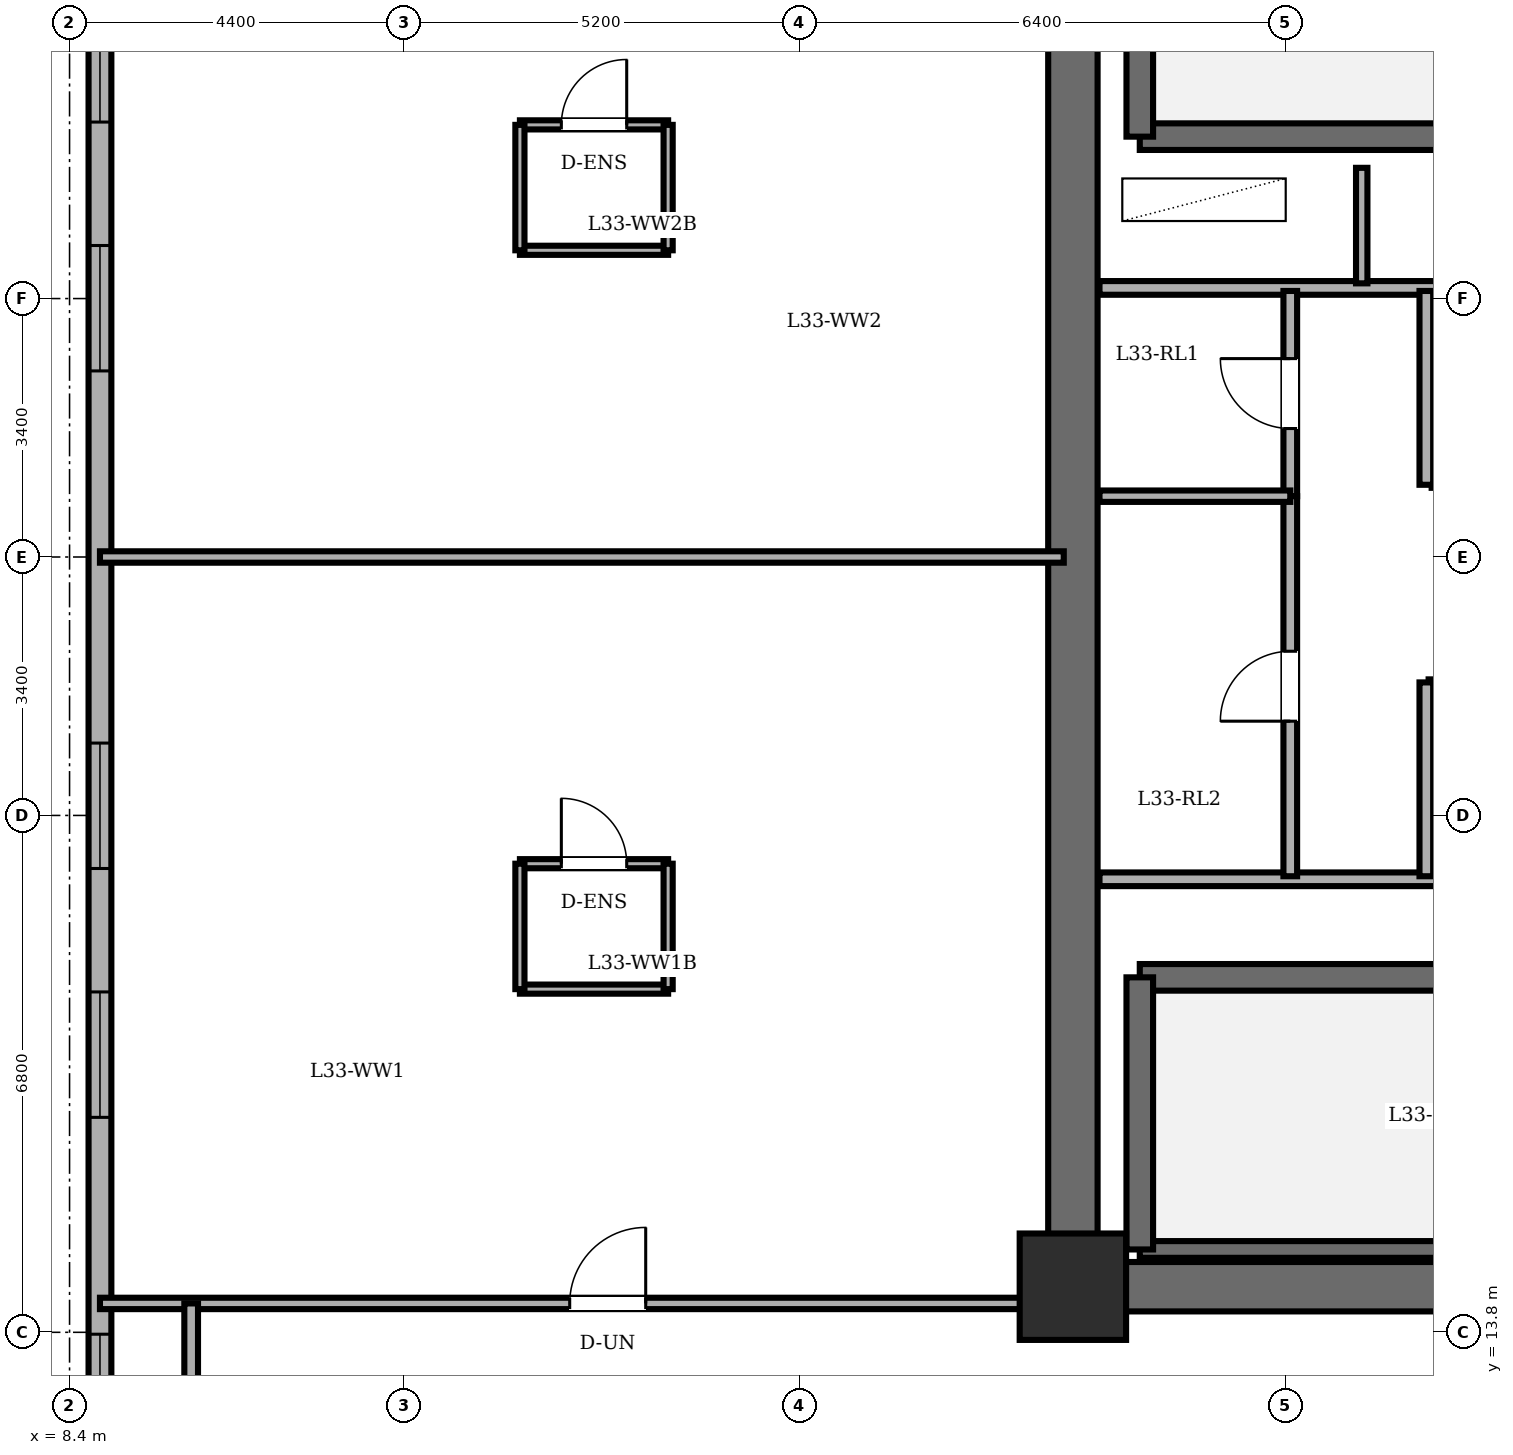
"""IFC4 building model, lengths in metres.
Left out: names, types, materials, properties, quantities, classifications, styles, units other than length and angle.
Written with IfcOpenShell. Run it as: python <this file> out.ifc"""

import sys

from ifc_helpers import new_model, si_unit, direction, frame, frame_2d, origin, origin_2d, place, context, subcontext, project, spatial, rectangle, extrude, element, fill, save


model = new_model("IFC4")
c1 = context("Model", 3, precision=1e-05, world=origin(), true_north=direction((0.0, 1.0)))
c2 = subcontext(c1, "Body", "Model", "MODEL_VIEW")
j1 = project(units=[si_unit("LENGTHUNIT", "METRE"), si_unit("PLANEANGLEUNIT", "RADIAN")], contexts=[c1])
p1 = place(None, origin())
s1 = spatial("IfcSite", under=j1, at=p1, CompositionType="ELEMENT")
p2 = place(p1, origin())
s2 = spatial("IfcBuilding", under=s1, at=p2, CompositionType="ELEMENT")
p3 = place(p2, frame((0.0, 0.0, 125.9)))
s3 = spatial("IfcBuildingStorey", under=s2, at=p3, CompositionType="ELEMENT", Elevation=125.9)
p4 = place(p3, frame((21.6, 14.4, 0.0), z_axis=(0.0, 0.0, 1.0), x_axis=(1.0, 0.0, 0.0)))
e1 = element("IfcColumn", 1, at=p4, inside=s3, PredefinedType="COLUMN", context=c2, shape_type="SweptSolid", body=[
    extrude(rectangle(XDim=1.4, YDim=1.4, at=origin_2d()), origin(), (0.0, 0.0, 1.0), 3.6),
])
p5 = place(p3, frame((8.8, 38.2, 0.0), z_axis=(0.0, 0.0, 1.0), x_axis=(0.0, -1.0, 0.0)))
e2 = element("IfcWall", 2, at=p5, inside=s3, PredefinedType="SOLIDWALL", context=c2, shape_type="SweptSolid", body=[
    extrude(rectangle(XDim=28.4, YDim=0.3, at=frame_2d((14.2, 0.0))), origin(), (0.0, 0.0, 1.0), 3.4),
])
p6 = place(p5, frame((2.325, 0.0, 0.85)))
e3 = element("IfcOpeningElement", 3, at=p6, cuts=e2, PredefinedType="OPENING", context=c2, shape_type="SweptSolid", body=[
    extrude(rectangle(XDim=1.65, YDim=1.55, at=frame_2d((0.825, 0.775))), frame((0.0, 0.16, 0.0), z_axis=(0.0, -1.0, 0.0), x_axis=(1.0, 0.0, 0.0)), (0.0, 0.0, 1.0), 0.32),
])
p7 = place(p5, frame((6.828, 0.0, 0.85)))
e4 = element("IfcOpeningElement", 4, at=p7, cuts=e2, PredefinedType="OPENING", context=c2, shape_type="SweptSolid", body=[
    extrude(rectangle(XDim=1.65, YDim=1.55, at=frame_2d((0.825, 0.775))), frame((0.0, 0.16, 0.0), z_axis=(0.0, -1.0, 0.0), x_axis=(1.0, 0.0, 0.0)), (0.0, 0.0, 1.0), 0.32),
])
p8 = place(p5, frame((10.102, 0.0, 0.85)))
e5 = element("IfcOpeningElement", 5, at=p8, cuts=e2, PredefinedType="OPENING", context=c2, shape_type="SweptSolid", body=[
    extrude(rectangle(XDim=1.65, YDim=1.55, at=frame_2d((0.825, 0.775))), frame((0.0, 0.16, 0.0), z_axis=(0.0, -1.0, 0.0), x_axis=(1.0, 0.0, 0.0)), (0.0, 0.0, 1.0), 0.32),
])
p9 = place(p5, frame((16.648, 0.0, 0.85)))
e6 = element("IfcOpeningElement", 6, at=p9, cuts=e2, PredefinedType="OPENING", context=c2, shape_type="SweptSolid", body=[
    extrude(rectangle(XDim=1.65, YDim=1.55, at=frame_2d((0.825, 0.775))), frame((0.0, 0.16, 0.0), z_axis=(0.0, -1.0, 0.0), x_axis=(1.0, 0.0, 0.0)), (0.0, 0.0, 1.0), 0.32),
])
p10 = place(p5, frame((19.922, 0.0, 0.85)))
e7 = element("IfcOpeningElement", 7, at=p10, cuts=e2, PredefinedType="OPENING", context=c2, shape_type="SweptSolid", body=[
    extrude(rectangle(XDim=1.65, YDim=1.55, at=frame_2d((0.825, 0.775))), frame((0.0, 0.16, 0.0), z_axis=(0.0, -1.0, 0.0), x_axis=(1.0, 0.0, 0.0)), (0.0, 0.0, 1.0), 0.32),
])
p11 = place(p5, frame((24.425, 0.0, 0.85)))
e8 = element("IfcOpeningElement", 8, at=p11, cuts=e2, PredefinedType="OPENING", context=c2, shape_type="SweptSolid", body=[
    extrude(rectangle(XDim=1.65, YDim=1.55, at=frame_2d((0.825, 0.775))), frame((0.0, 0.16, 0.0), z_axis=(0.0, -1.0, 0.0), x_axis=(1.0, 0.0, 0.0)), (0.0, 0.0, 1.0), 0.32),
])
p12 = place(p3, frame((21.6, 14.4, 0.0), z_axis=(0.0, 0.0, 1.0), x_axis=(0.0, 1.0, 0.0)))
e9 = element("IfcWall", 9, at=p12, inside=s3, PredefinedType="SHEAR", context=c2, shape_type="SweptSolid", body=[
    extrude(rectangle(XDim=19.2, YDim=0.65, at=frame_2d((9.6, 0.0))), origin(), (0.0, 0.0, 1.0), 3.4),
])
p13 = place(p3, frame((37.2, 14.4, 0.0), z_axis=(0.0, 0.0, 1.0), x_axis=(-1.0, 0.0, 0.0)))
e10 = element("IfcWall", 10, at=p13, inside=s3, PredefinedType="SHEAR", context=c2, shape_type="SweptSolid", body=[
    extrude(rectangle(XDim=15.6, YDim=0.65, at=frame_2d((7.8, 0.0))), origin(), (0.0, 0.0, 1.0), 3.4),
])
p14 = place(p3, frame((22.48, 29.53, 0.0), z_axis=(0.0, 0.0, 1.0), x_axis=(1.0, 0.0, 0.0)))
e11 = element("IfcWall", 11, at=p14, inside=s3, PredefinedType="SOLIDWALL", context=c2, shape_type="SweptSolid", body=[
    extrude(rectangle(XDim=7.79, YDim=0.35, at=frame_2d((3.895, 0.0))), origin(), (0.0, 0.0, 1.0), 3.4),
])
p15 = place(p3, frame((22.48, 29.53, 0.0), z_axis=(0.0, 0.0, 1.0), x_axis=(0.0, 1.0, 0.0)))
e12 = element("IfcWall", 12, at=p15, inside=s3, PredefinedType="SOLIDWALL", context=c2, shape_type="SweptSolid", body=[
    extrude(rectangle(XDim=3.58, YDim=0.35, at=frame_2d((1.79, 0.0))), origin(), (0.0, 0.0, 1.0), 3.4),
])
p16 = place(p3, frame((22.48, 18.47, 0.0), z_axis=(0.0, 0.0, 1.0), x_axis=(1.0, 0.0, 0.0)))
e13 = element("IfcWall", 13, at=p16, inside=s3, PredefinedType="SOLIDWALL", context=c2, shape_type="SweptSolid", body=[
    extrude(rectangle(XDim=7.79, YDim=0.35, at=frame_2d((3.895, 0.0))), origin(), (0.0, 0.0, 1.0), 3.4),
])
p17 = place(p3, frame((22.48, 14.89, 0.0), z_axis=(0.0, 0.0, 1.0), x_axis=(1.0, 0.0, 0.0)))
e14 = element("IfcWall", 14, at=p17, inside=s3, PredefinedType="PARTITIONING", context=c2, shape_type="SweptSolid", body=[
    extrude(rectangle(XDim=7.79, YDim=0.22, at=frame_2d((3.895, 0.0))), origin(), (0.0, 0.0, 1.0), 3.4),
])
p18 = place(p3, frame((22.48, 14.89, 0.0), z_axis=(0.0, 0.0, 1.0), x_axis=(0.0, 1.0, 0.0)))
e15 = element("IfcWall", 15, at=p18, inside=s3, PredefinedType="SOLIDWALL", context=c2, shape_type="SweptSolid", body=[
    extrude(rectangle(XDim=3.58, YDim=0.35, at=frame_2d((1.79, 0.0))), origin(), (0.0, 0.0, 1.0), 3.4),
])
p19 = place(p3, frame((21.95, 27.54, 0.0), z_axis=(0.0, 0.0, 1.0), x_axis=(1.0, 0.0, 0.0)))
e16 = element("IfcWall", 16, at=p19, inside=s3, PredefinedType="PARTITIONING", context=c2, shape_type="SweptSolid", body=[
    extrude(rectangle(XDim=10.56, YDim=0.18, at=frame_2d((5.28, 0.0))), origin(), (0.0, 0.0, 1.0), 3.4),
])
p20 = place(p3, frame((25.4, 27.6, 0.0), z_axis=(0.0, 0.0, 1.0), x_axis=(0.0, 1.0, 0.0)))
e17 = element("IfcWall", 17, at=p20, inside=s3, PredefinedType="PARTITIONING", context=c2, shape_type="SweptSolid", body=[
    extrude(rectangle(XDim=1.52, YDim=0.15, at=frame_2d((0.76, 0.0))), origin(), (0.0, 0.0, 1.0), 3.4),
])
p21 = place(p3, frame((21.95, 19.76, 0.0), z_axis=(0.0, 0.0, 1.0), x_axis=(1.0, 0.0, 0.0)))
e18 = element("IfcWall", 18, at=p21, inside=s3, PredefinedType="PARTITIONING", context=c2, shape_type="SweptSolid", body=[
    extrude(rectangle(XDim=14.87, YDim=0.18, at=frame_2d((7.435, 0.0))), origin(), (0.0, 0.0, 1.0), 3.4),
])
p22 = place(p3, frame((28.34, 25.0, 0.0), z_axis=(0.0, 0.0, 1.0), x_axis=(-1.0, 0.0, 0.0)))
e19 = element("IfcWall", 19, at=p22, inside=s3, PredefinedType="PARTITIONING", context=c2, shape_type="SweptSolid", body=[
    extrude(rectangle(XDim=2.02, YDim=0.18, at=frame_2d((1.01, 0.0))), origin(), (0.0, 0.0, 1.0), 3.4),
])
p23 = place(p22, frame((0.435, 0.0, 0.0)))
e20 = element("IfcOpeningElement", 20, at=p23, cuts=e19, PredefinedType="OPENING", context=c2, shape_type="SweptSolid", body=[
    extrude(rectangle(XDim=1.15, YDim=2.2, at=frame_2d((0.575, 1.1))), frame((0.0, 0.1, 0.0), z_axis=(0.0, -1.0, 0.0), x_axis=(1.0, 0.0, 0.0)), (0.0, 0.0, 1.0), 0.2),
])
p24 = place(p3, frame((26.28, 22.3, 0.0), z_axis=(0.0, 0.0, 1.0), x_axis=(1.0, 0.0, 0.0)))
e21 = element("IfcWall", 21, at=p24, inside=s3, PredefinedType="PARTITIONING", context=c2, shape_type="SweptSolid", body=[
    extrude(rectangle(XDim=2.0, YDim=0.18, at=frame_2d((1.0, 0.0))), origin(), (0.0, 0.0, 1.0), 3.4),
])
p25 = place(p24, frame((0.425, 0.0, 0.0)))
e22 = element("IfcOpeningElement", 22, at=p25, cuts=e21, PredefinedType="OPENING", context=c2, shape_type="SweptSolid", body=[
    extrude(rectangle(XDim=1.15, YDim=2.2, at=frame_2d((0.575, 1.1))), frame((0.0, 0.1, 0.0), z_axis=(0.0, -1.0, 0.0), x_axis=(1.0, 0.0, 0.0)), (0.0, 0.0, 1.0), 0.2),
])
p26 = place(p3, frame((24.46, 24.8, 0.0), z_axis=(0.0, 0.0, 1.0), x_axis=(0.0, 1.0, 0.0)))
e23 = element("IfcWall", 23, at=p26, inside=s3, PredefinedType="PARTITIONING", context=c2, shape_type="SweptSolid", body=[
    extrude(rectangle(XDim=2.7, YDim=0.18, at=frame_2d((1.35, 0.0))), origin(), (0.0, 0.0, 1.0), 3.4),
])
p27 = place(p26, frame((0.89, 0.0, 0.0)))
e24 = element("IfcOpeningElement", 24, at=p27, cuts=e23, PredefinedType="OPENING", context=c2, shape_type="SweptSolid", body=[
    extrude(rectangle(XDim=0.92, YDim=2.1, at=frame_2d((0.46, 1.05))), frame((0.0, 0.1, 0.0), z_axis=(0.0, -1.0, 0.0), x_axis=(1.0, 0.0, 0.0)), (0.0, 0.0, 1.0), 0.2),
])
p28 = place(p3, frame((24.46, 19.8, 0.0), z_axis=(0.0, 0.0, 1.0), x_axis=(0.0, 1.0, 0.0)))
e25 = element("IfcWall", 25, at=p28, inside=s3, PredefinedType="PARTITIONING", context=c2, shape_type="SweptSolid", body=[
    extrude(rectangle(XDim=5.0, YDim=0.18, at=frame_2d((2.5, 0.0))), origin(), (0.0, 0.0, 1.0), 3.4),
])
p29 = place(p28, frame((2.04, 0.0, 0.0)))
e26 = element("IfcOpeningElement", 26, at=p29, cuts=e25, PredefinedType="OPENING", context=c2, shape_type="SweptSolid", body=[
    extrude(rectangle(XDim=0.92, YDim=2.1, at=frame_2d((0.46, 1.05))), frame((0.0, 0.1, 0.0), z_axis=(0.0, -1.0, 0.0), x_axis=(1.0, 0.0, 0.0)), (0.0, 0.0, 1.0), 0.2),
])
p30 = place(p3, frame((21.95, 24.8, 0.0), z_axis=(0.0, 0.0, 1.0), x_axis=(1.0, 0.0, 0.0)))
e27 = element("IfcWall", 27, at=p30, inside=s3, PredefinedType="PARTITIONING", context=c2, shape_type="SweptSolid", body=[
    extrude(rectangle(XDim=2.51, YDim=0.15, at=frame_2d((1.255, 0.0))), origin(), (0.0, 0.0, 1.0), 3.4),
])
for number, where, z_axis, x_axis in (
    (28, (26.25, 24.95, 0.0), (0.0, 0.0, 1.0), (0.0, 1.0, 0.0)),
    (29, (26.25, 19.8, 0.0), (0.0, 0.0, 1.0), (0.0, 1.0, 0.0)),
):
    element("IfcWall", number, at=place(p3, frame(where, z_axis=z_axis, x_axis=x_axis)), inside=s3, PredefinedType="PARTITIONING", context=c2, shape_type="SweptSolid", body=[
        extrude(rectangle(XDim=2.55, YDim=0.18, at=frame_2d((1.275, 0.0))), origin(), (0.0, 0.0, 1.0), 3.4),
    ])
p31 = place(p3, frame((14.325, 19.965, 0.0), z_axis=(0.0, 0.0, 1.0), x_axis=(1.0, 0.0, 0.0)))
e30 = element("IfcWall", 30, at=p31, inside=s3, PredefinedType="PARTITIONING", context=c2, shape_type="SweptSolid", body=[
    extrude(rectangle(XDim=1.95, YDim=0.12, at=frame_2d((0.975, 0.0))), origin(), (0.0, 0.0, 1.0), 3.4),
])
p32 = place(p31, frame((0.545, 0.0, 0.0)))
e31 = element("IfcOpeningElement", 31, at=p32, cuts=e30, PredefinedType="OPENING", context=c2, shape_type="SweptSolid", body=[
    extrude(rectangle(XDim=0.86, YDim=2.1, at=frame_2d((0.43, 1.05))), frame((0.0, 0.07, 0.0), z_axis=(0.0, -1.0, 0.0), x_axis=(1.0, 0.0, 0.0)), (0.0, 0.0, 1.0), 0.14),
])
p33 = place(p3, frame((16.275, 18.315, 0.0), z_axis=(0.0, 0.0, 1.0), x_axis=(-1.0, 0.0, 0.0)))
e32 = element("IfcWall", 32, at=p33, inside=s3, PredefinedType="PARTITIONING", context=c2, shape_type="SweptSolid", body=[
    extrude(rectangle(XDim=1.95, YDim=0.12, at=frame_2d((0.975, 0.0))), origin(), (0.0, 0.0, 1.0), 3.4),
])
for number, where, z_axis, x_axis in (
    (33, (14.325, 19.965, 0.0), (0.0, 0.0, 1.0), (0.0, -1.0, 0.0)),
    (34, (16.275, 18.315, 0.0), (0.0, 0.0, 1.0), (0.0, 1.0, 0.0)),
):
    element("IfcWall", number, at=place(p3, frame(where, z_axis=z_axis, x_axis=x_axis)), inside=s3, PredefinedType="PARTITIONING", context=c2, shape_type="SweptSolid", body=[
        extrude(rectangle(XDim=1.65, YDim=0.12, at=frame_2d((0.825, 0.0))), origin(), (0.0, 0.0, 1.0), 3.4),
    ])
p34 = place(p3, frame((14.325, 29.685, 0.0), z_axis=(0.0, 0.0, 1.0), x_axis=(1.0, 0.0, 0.0)))
e35 = element("IfcWall", 35, at=p34, inside=s3, PredefinedType="PARTITIONING", context=c2, shape_type="SweptSolid", body=[
    extrude(rectangle(XDim=1.95, YDim=0.12, at=frame_2d((0.975, 0.0))), origin(), (0.0, 0.0, 1.0), 3.4),
])
p35 = place(p34, frame((0.545, 0.0, 0.0)))
e36 = element("IfcOpeningElement", 36, at=p35, cuts=e35, PredefinedType="OPENING", context=c2, shape_type="SweptSolid", body=[
    extrude(rectangle(XDim=0.86, YDim=2.1, at=frame_2d((0.43, 1.05))), frame((0.0, 0.07, 0.0), z_axis=(0.0, -1.0, 0.0), x_axis=(1.0, 0.0, 0.0)), (0.0, 0.0, 1.0), 0.14),
])
p36 = place(p3, frame((16.275, 28.035, 0.0), z_axis=(0.0, 0.0, 1.0), x_axis=(-1.0, 0.0, 0.0)))
e37 = element("IfcWall", 37, at=p36, inside=s3, PredefinedType="PARTITIONING", context=c2, shape_type="SweptSolid", body=[
    extrude(rectangle(XDim=1.95, YDim=0.12, at=frame_2d((0.975, 0.0))), origin(), (0.0, 0.0, 1.0), 3.4),
])
for number, where, z_axis, x_axis in (
    (38, (14.325, 29.685, 0.0), (0.0, 0.0, 1.0), (0.0, -1.0, 0.0)),
    (39, (16.275, 28.035, 0.0), (0.0, 0.0, 1.0), (0.0, 1.0, 0.0)),
):
    element("IfcWall", number, at=place(p3, frame(where, z_axis=z_axis, x_axis=x_axis)), inside=s3, PredefinedType="PARTITIONING", context=c2, shape_type="SweptSolid", body=[
        extrude(rectangle(XDim=1.65, YDim=0.12, at=frame_2d((0.825, 0.0))), origin(), (0.0, 0.0, 1.0), 3.4),
    ])
p37 = place(p3, frame((8.8, 14.18, 0.0), z_axis=(0.0, 0.0, 1.0), x_axis=(1.0, 0.0, 0.0)))
e40 = element("IfcWall", 40, at=p37, inside=s3, PredefinedType="PARTITIONING", context=c2, shape_type="SweptSolid", body=[
    extrude(rectangle(XDim=12.68, YDim=0.15, at=frame_2d((6.34, 0.0))), origin(), (0.0, 0.0, 1.0), 3.4),
])
p38 = place(p37, frame((6.18, 0.0, 0.0)))
e41 = element("IfcOpeningElement", 41, at=p38, cuts=e40, PredefinedType="OPENING", context=c2, shape_type="SweptSolid", body=[
    extrude(rectangle(XDim=1.0, YDim=2.15, at=frame_2d((0.5, 1.075))), frame((0.0, 0.085, 0.0), z_axis=(0.0, -1.0, 0.0), x_axis=(1.0, 0.0, 0.0)), (0.0, 0.0, 1.0), 0.17),
])
p39 = place(p3, frame((8.8, 24.0, 0.0), z_axis=(0.0, 0.0, 1.0), x_axis=(1.0, 0.0, 0.0)))
e42 = element("IfcWall", 42, at=p39, inside=s3, PredefinedType="PARTITIONING", context=c2, shape_type="SweptSolid", body=[
    extrude(rectangle(XDim=12.68, YDim=0.15, at=frame_2d((6.34, 0.0))), origin(), (0.0, 0.0, 1.0), 3.4),
])
p40 = place(p3, frame((10.0, 11.72, 0.0), z_axis=(0.0, 0.0, 1.0), x_axis=(0.0, 1.0, 0.0)))
e43 = element("IfcWall", 43, at=p40, inside=s3, PredefinedType="PARTITIONING", context=c2, shape_type="SweptSolid", body=[
    extrude(rectangle(XDim=2.46, YDim=0.18, at=frame_2d((1.23, 0.0))), origin(), (0.0, 0.0, 1.0), 3.4),
])
p41 = place(p7, origin())
e44 = element("IfcWindow", 44, at=p41, inside=s3, PartitioningType="DOUBLE_PANEL_VERTICAL", PredefinedType="WINDOW", context=c2, shape_type="SweptSolid", body=[
    extrude(rectangle(XDim=1.65, YDim=1.55, at=frame_2d((0.825, 0.775))), frame((0.0, 0.03, 0.0), z_axis=(0.0, -1.0, 0.0), x_axis=(1.0, 0.0, 0.0)), (0.0, 0.0, 1.0), 0.06),
])
fill(e4, e44)
p42 = place(p8, origin())
e45 = element("IfcWindow", 45, at=p42, inside=s3, PartitioningType="DOUBLE_PANEL_VERTICAL", PredefinedType="WINDOW", context=c2, shape_type="SweptSolid", body=[
    extrude(rectangle(XDim=1.65, YDim=1.55, at=frame_2d((0.825, 0.775))), frame((0.0, 0.03, 0.0), z_axis=(0.0, -1.0, 0.0), x_axis=(1.0, 0.0, 0.0)), (0.0, 0.0, 1.0), 0.06),
])
fill(e5, e45)
p43 = place(p9, origin())
e46 = element("IfcWindow", 46, at=p43, inside=s3, PartitioningType="DOUBLE_PANEL_VERTICAL", PredefinedType="WINDOW", context=c2, shape_type="SweptSolid", body=[
    extrude(rectangle(XDim=1.65, YDim=1.55, at=frame_2d((0.825, 0.775))), frame((0.0, 0.03, 0.0), z_axis=(0.0, -1.0, 0.0), x_axis=(1.0, 0.0, 0.0)), (0.0, 0.0, 1.0), 0.06),
])
fill(e6, e46)
p44 = place(p10, origin())
e47 = element("IfcWindow", 47, at=p44, inside=s3, PartitioningType="DOUBLE_PANEL_VERTICAL", PredefinedType="WINDOW", context=c2, shape_type="SweptSolid", body=[
    extrude(rectangle(XDim=1.65, YDim=1.55, at=frame_2d((0.825, 0.775))), frame((0.0, 0.03, 0.0), z_axis=(0.0, -1.0, 0.0), x_axis=(1.0, 0.0, 0.0)), (0.0, 0.0, 1.0), 0.06),
])
fill(e7, e47)
p45 = place(p11, origin())
e48 = element("IfcWindow", 48, at=p45, inside=s3, PartitioningType="DOUBLE_PANEL_VERTICAL", PredefinedType="WINDOW", context=c2, shape_type="SweptSolid", body=[
    extrude(rectangle(XDim=1.65, YDim=1.55, at=frame_2d((0.825, 0.775))), frame((0.0, 0.03, 0.0), z_axis=(0.0, -1.0, 0.0), x_axis=(1.0, 0.0, 0.0)), (0.0, 0.0, 1.0), 0.06),
])
fill(e8, e48)
p46 = place(p27, origin())
e49 = element("IfcDoor", 49, at=p46, inside=s3, OperationType="SINGLE_SWING_RIGHT", PredefinedType="DOOR", context=c2, shape_type="SweptSolid", body=[
    extrude(rectangle(XDim=0.92, YDim=2.1, at=frame_2d((0.46, 1.05))), frame((0.0, 0.025, 0.0), z_axis=(0.0, -1.0, 0.0), x_axis=(1.0, 0.0, 0.0)), (0.0, 0.0, 1.0), 0.05),
])
fill(e24, e49)
p47 = place(p29, origin())
e50 = element("IfcDoor", 50, at=p47, inside=s3, OperationType="SINGLE_SWING_LEFT", PredefinedType="DOOR", context=c2, shape_type="SweptSolid", body=[
    extrude(rectangle(XDim=0.92, YDim=2.1, at=frame_2d((0.46, 1.05))), frame((0.0, 0.025, 0.0), z_axis=(0.0, -1.0, 0.0), x_axis=(1.0, 0.0, 0.0)), (0.0, 0.0, 1.0), 0.05),
])
fill(e26, e50)
p48 = place(p32, origin())
e51 = element("IfcDoor", 51, at=p48, inside=s3, OperationType="SINGLE_SWING_LEFT", PredefinedType="DOOR", context=c2, shape_type="SweptSolid", body=[
    extrude(rectangle(XDim=0.86, YDim=2.1, at=frame_2d((0.43, 1.05))), frame((0.0, 0.025, 0.0), z_axis=(0.0, -1.0, 0.0), x_axis=(1.0, 0.0, 0.0)), (0.0, 0.0, 1.0), 0.05),
])
fill(e31, e51)
p49 = place(p35, origin())
e52 = element("IfcDoor", 52, at=p49, inside=s3, OperationType="SINGLE_SWING_RIGHT", PredefinedType="DOOR", context=c2, shape_type="SweptSolid", body=[
    extrude(rectangle(XDim=0.86, YDim=2.1, at=frame_2d((0.43, 1.05))), frame((0.0, 0.025, 0.0), z_axis=(0.0, -1.0, 0.0), x_axis=(1.0, 0.0, 0.0)), (0.0, 0.0, 1.0), 0.05),
])
fill(e36, e52)
p50 = place(p38, origin())
e53 = element("IfcDoor", 53, at=p50, inside=s3, OperationType="SINGLE_SWING_RIGHT", PredefinedType="DOOR", context=c2, shape_type="SweptSolid", body=[
    extrude(rectangle(XDim=1.0, YDim=2.15, at=frame_2d((0.5, 1.075))), frame((0.0, 0.025, 0.0), z_axis=(0.0, -1.0, 0.0), x_axis=(1.0, 0.0, 0.0)), (0.0, 0.0, 1.0), 0.05),
])
fill(e41, e53)
save(model, sys.argv[1])
